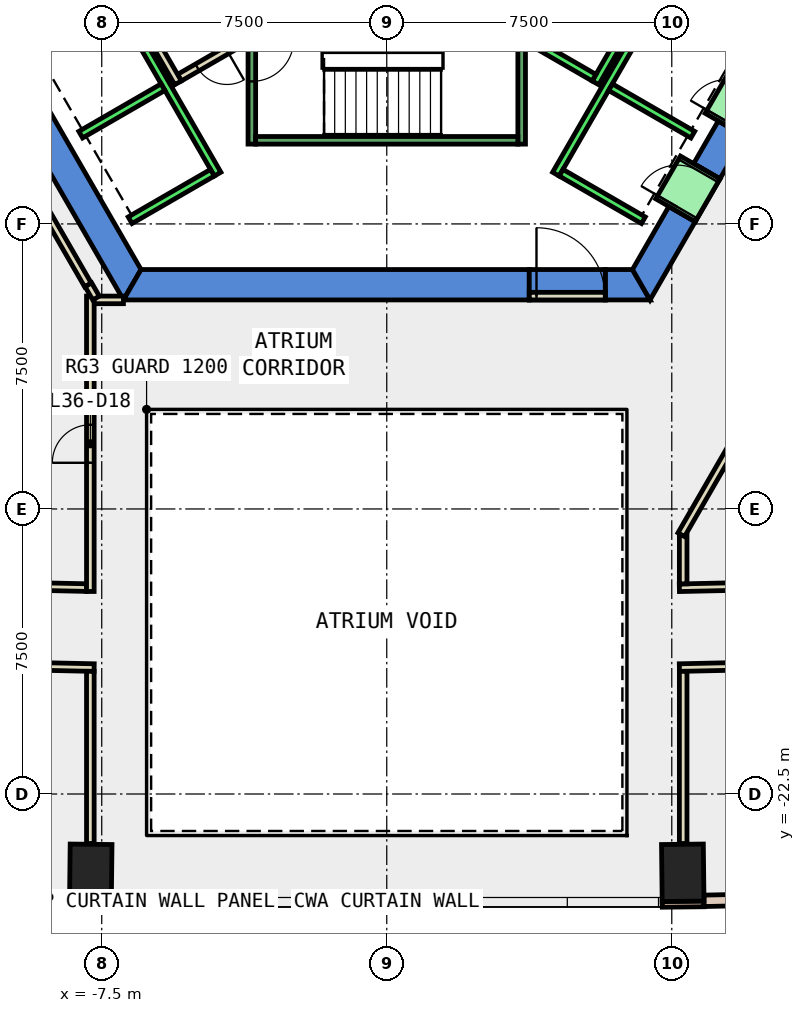
"""IFC4 building model, lengths in metres.
Left out: names, types, materials, properties, quantities, classifications, styles, units other than length and angle.
Written with IfcOpenShell. Run it as: python <this file> out.ifc"""

import sys

from ifc_helpers import new_model, si_unit, direction, frame, frame_2d, origin, origin_2d, place, context, subcontext, project, spatial, polyline, rectangle, outline, extrude, element, fill, save


model = new_model("IFC4")
c1 = context("Model", 3, precision=1e-05, world=origin(), true_north=direction((0.0, 1.0)))
c2 = subcontext(c1, "Body", "Model", "MODEL_VIEW")
j1 = project(units=[si_unit("LENGTHUNIT", "METRE"), si_unit("PLANEANGLEUNIT", "RADIAN")], contexts=[c1])
p1 = place(None, origin())
s1 = spatial("IfcSite", under=j1, at=p1, CompositionType="ELEMENT")
p2 = place(p1, origin())
s2 = spatial("IfcBuilding", under=s1, at=p2, CompositionType="ELEMENT")
p3 = place(p2, frame((0.0, 0.0, 163.4)))
s3 = spatial("IfcBuildingStorey", under=s2, at=p3, CompositionType="ELEMENT", Elevation=163.4)
for number, where, z_axis, x_axis in (
    (1, (-7.789, -24.573, -0.4), (0.0, 0.0, 1.0), (-1.0, 0.012, 0.0)),
    (2, (7.789, -24.573, -0.4), (0.0, 0.0, 1.0), (1.0, 0.012, 0.0)),
):
    element("IfcColumn", number, at=place(p3, frame(where, z_axis=z_axis, x_axis=x_axis)), inside=s3, PredefinedType="COLUMN", context=c2, shape_type="SweptSolid", body=[
        extrude(rectangle(XDim=1.1, YDim=1.5, at=origin_2d()), origin(), (0.0, 0.0, 1.0), 4.2),
    ])
p4 = place(p3, frame((0.0, 0.0, -0.4)))
e3 = element("IfcWall", 3, at=p4, inside=s3, PredefinedType="SHEAR", context=c2, shape_type="SweptSolid", body=[
    extrude(outline(polyline([(-13.856, 2.5), (-6.928, -9.5), (-6.466, -8.7), (-12.933, 2.5), (-13.856, 2.5)])), origin(), (0.0, 0.0, 1.0), 4.2),
])
p5 = place(p3, frame((0.0, 0.0, -0.4)))
e4 = element("IfcWall", 4, at=p5, inside=s3, PredefinedType="SHEAR", context=c2, shape_type="SweptSolid", body=[
    extrude(outline(polyline([(3.75, -9.5), (3.75, -8.7), (-6.466, -8.7), (-6.928, -9.5), (3.75, -9.5)])), origin(), (0.0, 0.0, 1.0), 4.2),
])
p6 = place(p3, frame((0.0, 0.0, -0.4)))
e5 = element("IfcWall", 5, at=p6, inside=s3, PredefinedType="SHEAR", context=c2, shape_type="SweptSolid", body=[
    extrude(outline(polyline([(5.75, -8.7), (5.75, -9.5), (6.928, -9.5), (6.466, -8.7), (5.75, -8.7)])), origin(), (0.0, 0.0, 1.0), 4.2),
])
p7 = place(p3, frame((0.0, 0.0, 3.6)))
e6 = element("IfcWall", 6, at=p7, inside=s3, PredefinedType="SHEAR", context=c2, shape_type="SweptSolid", body=[
    extrude(outline(polyline([(5.75, -9.5), (5.75, -8.7), (3.75, -8.7), (3.75, -9.5), (5.75, -9.5)])), origin(), (0.0, 0.0, 1.0), 0.2),
])
p8 = place(p3, frame((0.0, 0.0, -0.4)))
e7 = element("IfcWall", 7, at=p8, inside=s3, PredefinedType="SHEAR", context=c2, shape_type="SweptSolid", body=[
    extrude(outline(polyline([(8.117, -7.44), (7.424, -7.04), (6.466, -8.7), (6.928, -9.5), (8.117, -7.44)])), origin(), (0.0, 0.0, 1.0), 4.2),
])
p9 = place(p3, frame((0.0, 0.0, -0.4)))
e8 = element("IfcWall", 8, at=p9, inside=s3, PredefinedType="SHEAR", context=c2, shape_type="SweptSolid", body=[
    extrude(outline(polyline([(9.417, -5.189), (8.724, -4.789), (8.075, -5.914), (8.767, -6.314), (9.417, -5.189)])), origin(), (0.0, 0.0, 1.0), 4.2),
])
p10 = place(p3, frame((0.0, 0.0, 3.6)))
e9 = element("IfcWall", 9, at=p10, inside=s3, PredefinedType="SHEAR", context=c2, shape_type="SweptSolid", body=[
    extrude(outline(polyline([(8.767, -6.314), (8.075, -5.914), (7.424, -7.04), (8.117, -7.44), (8.767, -6.314)])), origin(), (0.0, 0.0, 1.0), 0.2),
])
p11 = place(p3, frame((0.0, 0.0, 3.6)))
e10 = element("IfcWall", 10, at=p11, inside=s3, PredefinedType="SHEAR", context=c2, shape_type="SweptSolid", body=[
    extrude(outline(polyline([(10.067, -4.063), (9.374, -3.663), (8.724, -4.789), (9.417, -5.189), (10.067, -4.063)])), origin(), (0.0, 0.0, 1.0), 0.2),
])
for number, where, z_axis, x_axis in (
    (11, (-8.349, -25.392, 0.0), (0.0, 0.0, 1.0), (1.0, -0.011, 0.0)),
    (12, (7.249, -25.404, 0.0), (0.0, 0.0, 1.0), (1.0, 0.011, 0.0)),
):
    element("IfcWall", number, at=place(p3, frame(where, z_axis=z_axis, x_axis=x_axis)), inside=s3, PredefinedType="STANDARD", context=c2, shape_type="SweptSolid", body=[
        extrude(rectangle(XDim=1.1, YDim=0.15, at=frame_2d((0.55, 0.0))), origin(), (0.0, 0.0, 1.0), 3.8),
    ])
p12 = place(p3, frame((-15.68, -25.152, 0.0), z_axis=(0.0, 0.0, 1.0), x_axis=(0.999765201774, -0.021668902196, 0.0)))
e13 = element("IfcWall", 13, at=p12, inside=s3, PredefinedType="STANDARD", context=c2, shape_type="SweptSolid", body=[
    extrude(rectangle(XDim=7.335, YDim=0.3, at=frame_2d((3.667, 0.0))), origin(), (0.0, 0.0, 1.0), 3.8),
])
p13 = place(p12, frame((0.634, 0.0, 0.9)))
e14 = element("IfcOpeningElement", 14, at=p13, cuts=e13, PredefinedType="OPENING", context=c2, shape_type="SweptSolid", body=[
    extrude(rectangle(XDim=2.4, YDim=2.6, at=frame_2d((1.2, 1.3))), frame((0.0, 0.16, 0.0), z_axis=(0.0, -1.0, 0.0), x_axis=(1.0, 0.0, 0.0)), (0.0, 0.0, 1.0), 0.32),
])
p14 = place(p12, frame((4.301, 0.0, 0.9)))
e15 = element("IfcOpeningElement", 15, at=p14, cuts=e13, PredefinedType="OPENING", context=c2, shape_type="SweptSolid", body=[
    extrude(rectangle(XDim=2.4, YDim=2.6, at=frame_2d((1.2, 1.3))), frame((0.0, 0.16, 0.0), z_axis=(0.0, -1.0, 0.0), x_axis=(1.0, 0.0, 0.0)), (0.0, 0.0, 1.0), 0.32),
])
p15 = place(p3, frame((8.347, -25.311, 0.0), z_axis=(0.0, 0.0, 1.0), x_axis=(0.999765201774, 0.021668902196, 0.0)))
e16 = element("IfcWall", 16, at=p15, inside=s3, PredefinedType="STANDARD", context=c2, shape_type="SweptSolid", body=[
    extrude(rectangle(XDim=7.335, YDim=0.3, at=frame_2d((3.667, 0.0))), origin(), (0.0, 0.0, 1.0), 3.8),
])
p16 = place(p15, frame((0.634, 0.0, 0.9)))
e17 = element("IfcOpeningElement", 17, at=p16, cuts=e16, PredefinedType="OPENING", context=c2, shape_type="SweptSolid", body=[
    extrude(rectangle(XDim=2.4, YDim=2.6, at=frame_2d((1.2, 1.3))), frame((0.0, 0.16, 0.0), z_axis=(0.0, -1.0, 0.0), x_axis=(1.0, 0.0, 0.0)), (0.0, 0.0, 1.0), 0.32),
])
p17 = place(p15, frame((4.301, 0.0, 0.9)))
e18 = element("IfcOpeningElement", 18, at=p17, cuts=e16, PredefinedType="OPENING", context=c2, shape_type="SweptSolid", body=[
    extrude(rectangle(XDim=2.4, YDim=2.6, at=frame_2d((1.2, 1.3))), frame((0.0, 0.16, 0.0), z_axis=(0.0, -1.0, 0.0), x_axis=(1.0, 0.0, 0.0)), (0.0, 0.0, 1.0), 0.32),
])
p18 = place(p3, frame((7.7, -17.073, 0.0), z_axis=(0.0, 0.0, 1.0), x_axis=(0.999764372799, 0.021707115919, 0.0)))
e19 = element("IfcWall", 19, at=p18, inside=s3, PredefinedType="PARTITIONING", context=c2, shape_type="SweptSolid", body=[
    extrude(rectangle(XDim=8.289, YDim=0.2, at=frame_2d((4.145, 0.0))), origin(), (0.0, 0.0, 1.0), 3.8),
])
p19 = place(p18, frame((3.245, 0.0, 0.0)))
e20 = element("IfcOpeningElement", 20, at=p19, cuts=e19, PredefinedType="OPENING", context=c2, shape_type="SweptSolid", body=[
    extrude(rectangle(XDim=1.8, YDim=2.1, at=frame_2d((0.9, 1.05))), frame((0.0, 0.11, 0.0), z_axis=(0.0, -1.0, 0.0), x_axis=(1.0, 0.0, 0.0)), (0.0, 0.0, 1.0), 0.22),
])
p20 = place(p3, frame((-11.278, -16.996, 0.0), z_axis=(0.0, 0.0, 1.0), x_axis=(0.999766613119, -0.021603687022, 0.0)))
e21 = element("IfcWall", 21, at=p20, inside=s3, PredefinedType="PARTITIONING", context=c2, shape_type="SweptSolid", body=[
    extrude(rectangle(XDim=3.379, YDim=0.2, at=frame_2d((1.689, 0.0))), origin(), (0.0, 0.0, 1.0), 3.8),
])
p21 = place(p3, frame((16.049, -18.992, 0.0), z_axis=(0.0, 0.0, 1.0), x_axis=(-0.999762156504, -0.021808952826, 0.0)))
e22 = element("IfcWall", 22, at=p21, inside=s3, PredefinedType="PARTITIONING", context=c2, shape_type="SweptSolid", body=[
    extrude(rectangle(XDim=8.351, YDim=0.2, at=frame_2d((4.176, 0.0))), origin(), (0.0, 0.0, 1.0), 3.8),
])
p22 = place(p21, frame((3.675, 0.0, 0.0)))
e23 = element("IfcOpeningElement", 23, at=p22, cuts=e22, PredefinedType="OPENING", context=c2, shape_type="SweptSolid", body=[
    extrude(rectangle(XDim=1.0, YDim=2.1, at=frame_2d((0.5, 1.05))), frame((0.0, 0.11, 0.0), z_axis=(0.0, -1.0, 0.0), x_axis=(1.0, 0.0, 0.0)), (0.0, 0.0, 1.0), 0.22),
])
p23 = place(p3, frame((-7.7, -19.174, 0.0), z_axis=(0.0, 0.0, 1.0), x_axis=(-0.999762993889, 0.02177053169, 0.0)))
e24 = element("IfcWall", 24, at=p23, inside=s3, PredefinedType="PARTITIONING", context=c2, shape_type="SweptSolid", body=[
    extrude(rectangle(XDim=8.276, YDim=0.2, at=frame_2d((4.138, 0.0))), origin(), (0.0, 0.0, 1.0), 3.8),
])
p24 = place(p23, frame((3.713, 0.0, 0.0)))
e25 = element("IfcOpeningElement", 25, at=p24, cuts=e24, PredefinedType="OPENING", context=c2, shape_type="SweptSolid", body=[
    extrude(rectangle(XDim=1.0, YDim=2.1, at=frame_2d((0.5, 1.05))), frame((0.0, 0.11, 0.0), z_axis=(0.0, -1.0, 0.0), x_axis=(1.0, 0.0, 0.0)), (0.0, 0.0, 1.0), 0.22),
])
p25 = place(p3, frame((-3.65, -2.61, 0.0), z_axis=(0.0, 0.0, 1.0), x_axis=(-0.866072462134, -0.499918483688, 0.0)))
e26 = element("IfcWall", 26, at=p25, inside=s3, PredefinedType="PARTITIONING", context=c2, shape_type="SweptSolid", body=[
    extrude(rectangle(XDim=2.084, YDim=0.2, at=frame_2d((1.042, 0.0))), origin(), (0.0, 0.0, 1.0), 3.8),
])
p26 = place(p25, frame((0.642, 0.0, 0.0)))
e27 = element("IfcOpeningElement", 27, at=p26, cuts=e26, PredefinedType="OPENING", context=c2, shape_type="SweptSolid", body=[
    extrude(rectangle(XDim=0.9, YDim=2.1, at=frame_2d((0.45, 1.05))), frame((0.0, 0.11, 0.0), z_axis=(0.0, -1.0, 0.0), x_axis=(1.0, 0.0, 0.0)), (0.0, 0.0, 1.0), 0.22),
])
p27 = place(p3, frame((-5.492, -3.788, 0.0), z_axis=(0.0, 0.0, 1.0), x_axis=(-0.500008949224, 0.866020236886, 0.0)))
e28 = element("IfcWall", 28, at=p27, inside=s3, PredefinedType="PARTITIONING", context=c2, shape_type="SweptSolid", body=[
    extrude(rectangle(XDim=2.68, YDim=0.2, at=frame_2d((1.34, 0.0))), origin(), (0.0, 0.0, 1.0), 3.8),
])
p28 = place(p3, frame((7.8, -15.69, 0.0), z_axis=(0.0, 0.0, 1.0), x_axis=(0.0, -1.0, 0.0)))
e29 = element("IfcWall", 29, at=p28, inside=s3, PredefinedType="PARTITIONING", context=c2, shape_type="SweptSolid", body=[
    extrude(rectangle(XDim=1.281, YDim=0.2, at=frame_2d((0.641, 0.0))), origin(), (0.0, 0.0, 1.0), 3.8),
])
p29 = place(p3, frame((-7.722, -9.499, 0.0), z_axis=(0.0, 0.0, 1.0), x_axis=(1.0, 0.0, 0.0)))
e30 = element("IfcWall", 30, at=p29, inside=s3, PredefinedType="PARTITIONING", context=c2, shape_type="SweptSolid", body=[
    extrude(rectangle(XDim=0.793, YDim=0.2, at=frame_2d((0.396, 0.0))), origin(), (0.0, 0.0, 1.0), 3.8),
])
p30 = place(p3, frame((-7.8, -17.171, 0.0), z_axis=(0.0, 0.0, 1.0), x_axis=(0.0, 1.0, 0.0)))
e31 = element("IfcWall", 31, at=p30, inside=s3, PredefinedType="PARTITIONING", context=c2, shape_type="SweptSolid", body=[
    extrude(rectangle(XDim=7.772, YDim=0.2, at=frame_2d((3.886, 0.0))), origin(), (0.0, 0.0, 1.0), 3.8),
])
p31 = place(p30, frame((3.386, 0.0, 0.0)))
e32 = element("IfcOpeningElement", 32, at=p31, cuts=e31, PredefinedType="OPENING", context=c2, shape_type="SweptSolid", body=[
    extrude(rectangle(XDim=1.0, YDim=2.1, at=frame_2d((0.5, 1.05))), frame((0.0, 0.11, 0.0), z_axis=(0.0, -1.0, 0.0), x_axis=(1.0, 0.0, 0.0)), (0.0, 0.0, 1.0), 0.22),
])
for number, where, z_axis, x_axis in (
    (33, (7.8, -19.272, 0.0), (0.0, 0.0, 1.0), (0.0, -1.0, 0.0)),
    (34, (-7.8, -23.803, 0.0), (0.0, 0.0, 1.0), (0.0, 1.0, 0.0)),
):
    element("IfcWall", number, at=place(p3, frame(where, z_axis=z_axis, x_axis=x_axis)), inside=s3, PredefinedType="PARTITIONING", context=c2, shape_type="SweptSolid", body=[
        extrude(rectangle(XDim=4.531, YDim=0.2, at=frame_2d((2.266, 0.0))), origin(), (0.0, 0.0, 1.0), 3.8),
    ])
p32 = place(p3, frame((-7.862, -9.107, 0.0), z_axis=(0.0, 0.0, 1.0), x_axis=(-0.499994038704, 0.866028845513, 0.0)))
e35 = element("IfcWall", 35, at=p32, inside=s3, PredefinedType="PARTITIONING", context=c2, shape_type="SweptSolid", body=[
    extrude(rectangle(XDim=2.568, YDim=0.2, at=frame_2d((1.284, 0.0))), origin(), (0.0, 0.0, 1.0), 3.8),
])
p33 = place(p3, frame((-7.65, -9.451, 0.0), z_axis=(0.0, 0.0, 1.0), x_axis=(-0.500297731093, 0.865853440406, 0.0)))
e36 = element("IfcWall", 36, at=p33, inside=s3, PredefinedType="PARTITIONING", context=c2, shape_type="SweptSolid", body=[
    extrude(rectangle(XDim=0.404, YDim=0.2, at=frame_2d((0.202, 0.0))), origin(), (0.0, 0.0, 1.0), 3.8),
])
p34 = place(p3, frame((3.75, -9.4, 0.0), z_axis=(0.0, 0.0, 1.0), x_axis=(1.0, 0.0, 0.0)))
e37 = element("IfcWall", 37, at=p34, inside=s3, PredefinedType="PARTITIONING", context=c2, shape_type="SweptSolid", body=[
    extrude(rectangle(XDim=2.0, YDim=0.2, at=frame_2d((1.0, 0.0))), origin(), (0.0, 0.0, 1.0), 2.4),
])
p35 = place(p34, frame((0.19, 0.0, 0.0)))
e38 = element("IfcOpeningElement", 38, at=p35, cuts=e37, PredefinedType="OPENING", context=c2, shape_type="SweptSolid", body=[
    extrude(rectangle(XDim=1.8, YDim=2.1, at=frame_2d((0.9, 1.05))), frame((0.0, 0.11, 0.0), z_axis=(0.0, -1.0, 0.0), x_axis=(1.0, 0.0, 0.0)), (0.0, 0.0, 1.0), 0.22),
])
p36 = place(p3, frame((12.401, -7.621, 0.0), z_axis=(0.0, 0.0, 1.0), x_axis=(-0.499983724212, -0.866034800411, 0.0)))
e39 = element("IfcWall", 39, at=p36, inside=s3, PredefinedType="PARTITIONING", context=c2, shape_type="SweptSolid", body=[
    extrude(rectangle(XDim=9.302, YDim=0.2, at=frame_2d((4.651, 0.0))), origin(), (0.0, 0.0, 1.0), 3.8),
])
p37 = place(p3, frame((-9.751, 2.99, 0.0), z_axis=(0.0, 0.0, 1.0), x_axis=(0.50000090737, -0.866024879913, 0.0)))
e40 = element("IfcWall", 40, at=p37, inside=s3, PredefinedType="STANDARD", context=c2, shape_type="SweptSolid", body=[
    extrude(rectangle(XDim=10.6, YDim=0.2, at=frame_2d((5.3, 0.0))), origin(), (0.0, 0.0, 1.0), 3.8),
])
for number, where, z_axis, x_axis in (
    (41, (-5.888, -3.902, 0.0), (0.0, 0.0, 1.0), (-0.866, -0.5, 0.0)),
    (42, (-4.588, -6.153, 0.0), (0.0, 0.0, 1.0), (-0.866, -0.5, 0.0)),
):
    element("IfcWall", number, at=place(p3, frame(where, z_axis=z_axis, x_axis=x_axis)), inside=s3, PredefinedType="STANDARD", context=c2, shape_type="SweptSolid", body=[
        extrude(rectangle(XDim=2.5, YDim=0.2, at=frame_2d((1.25, 0.0))), origin(), (0.0, 0.0, 1.0), 3.8),
    ])
p38 = place(p3, frame((5.492, -3.788, 0.0), z_axis=(0.0, 0.0, 1.0), x_axis=(0.500011755427, 0.866018616679, 0.0)))
e43 = element("IfcWall", 43, at=p38, inside=s3, PredefinedType="STANDARD", context=c2, shape_type="SweptSolid", body=[
    extrude(rectangle(XDim=2.8, YDim=0.2, at=frame_2d((1.4, 0.0))), origin(), (0.0, 0.0, 1.0), 3.8),
])
p39 = place(p3, frame((3.377, -2.452, 0.0), z_axis=(0.0, 0.0, 1.0), x_axis=(0.865955154139, -0.50012165622, 0.0)))
e44 = element("IfcWall", 44, at=p39, inside=s3, PredefinedType="STANDARD", context=c2, shape_type="SweptSolid", body=[
    extrude(rectangle(XDim=2.4, YDim=0.2, at=frame_2d((1.2, 0.0))), origin(), (0.0, 0.0, 1.0), 3.8),
])
p40 = place(p3, frame((4.451, -6.19, 0.0), z_axis=(0.0, 0.0, 1.0), x_axis=(0.50000090737, 0.866024879913, 0.0)))
e45 = element("IfcWall", 45, at=p40, inside=s3, PredefinedType="STANDARD", context=c2, shape_type="SweptSolid", body=[
    extrude(rectangle(XDim=10.6, YDim=0.2, at=frame_2d((5.3, 0.0))), origin(), (0.0, 0.0, 1.0), 3.8),
])
for number, where, z_axis, x_axis in (
    (46, (4.588, -6.153, 0.0), (0.0, 0.0, 1.0), (0.866, -0.5, 0.0)),
    (47, (5.888, -3.902, 0.0), (0.0, 0.0, 1.0), (0.866, -0.5, 0.0)),
):
    element("IfcWall", number, at=place(p3, frame(where, z_axis=z_axis, x_axis=x_axis)), inside=s3, PredefinedType="STANDARD", context=c2, shape_type="SweptSolid", body=[
        extrude(rectangle(XDim=2.5, YDim=0.2, at=frame_2d((1.25, 0.0))), origin(), (0.0, 0.0, 1.0), 3.8),
    ])
p41 = place(p3, frame((7.598, -7.14, 0.0), z_axis=(0.0, 0.0, 1.0), x_axis=(0.500362116554, 0.865816234728, 0.0)))
e48 = element("IfcWall", 48, at=p41, inside=s3, PredefinedType="STANDARD", context=c2, shape_type="SweptSolid", body=[
    extrude(rectangle(XDim=1.299, YDim=1.2, at=frame_2d((0.65, 0.0))), origin(), (0.0, 0.0, 1.0), 2.4),
])
p42 = place(p41, frame((0.1, 0.0, 0.0)))
e49 = element("IfcOpeningElement", 49, at=p42, cuts=e48, PredefinedType="OPENING", context=c2, shape_type="SweptSolid", body=[
    extrude(rectangle(XDim=1.1, YDim=2.3, at=frame_2d((0.55, 1.15))), frame((0.0, 0.61, 0.0), z_axis=(0.0, -1.0, 0.0), x_axis=(1.0, 0.0, 0.0)), (0.0, 0.0, 1.0), 1.22),
])
p43 = place(p3, frame((8.898, -4.889, 0.0), z_axis=(0.0, 0.0, 1.0), x_axis=(0.500036693733, 0.866004217611, 0.0)))
e50 = element("IfcWall", 50, at=p43, inside=s3, PredefinedType="STANDARD", context=c2, shape_type="SweptSolid", body=[
    extrude(rectangle(XDim=1.3, YDim=1.2, at=frame_2d((0.65, 0.0))), origin(), (0.0, 0.0, 1.0), 2.4),
])
p44 = place(p43, frame((0.1, 0.0, 0.0)))
e51 = element("IfcOpeningElement", 51, at=p44, cuts=e50, PredefinedType="OPENING", context=c2, shape_type="SweptSolid", body=[
    extrude(rectangle(XDim=1.1, YDim=2.3, at=frame_2d((0.55, 1.15))), frame((0.0, 0.61, 0.0), z_axis=(0.0, -1.0, 0.0), x_axis=(1.0, 0.0, 0.0)), (0.0, 0.0, 1.0), 1.22),
])
p45 = place(p3, frame((-3.55, -1.0, 0.0), z_axis=(0.0, 0.0, 1.0), x_axis=(0.0, -1.0, 0.0)))
e52 = element("IfcWall", 52, at=p45, inside=s3, PredefinedType="STANDARD", context=c2, shape_type="SweptSolid", body=[
    extrude(rectangle(XDim=4.4, YDim=0.2, at=frame_2d((2.2, 0.0))), origin(), (0.0, 0.0, 1.0), 3.8),
])
p46 = place(p45, frame((1.65, 0.0, 0.0)))
e53 = element("IfcOpeningElement", 53, at=p46, cuts=e52, PredefinedType="OPENING", context=c2, shape_type="SweptSolid", body=[
    extrude(rectangle(XDim=1.1, YDim=2.2, at=frame_2d((0.55, 1.1))), frame((0.0, 0.11, 0.0), z_axis=(0.0, -1.0, 0.0), x_axis=(1.0, 0.0, 0.0)), (0.0, 0.0, 1.0), 0.22),
])
p47 = place(p3, frame((3.55, -2.667, 0.0), z_axis=(0.0, 0.0, 1.0), x_axis=(0.0, -1.0, 0.0)))
e54 = element("IfcWall", 54, at=p47, inside=s3, PredefinedType="STANDARD", context=c2, shape_type="SweptSolid", body=[
    extrude(rectangle(XDim=2.733, YDim=0.2, at=frame_2d((1.366, 0.0))), origin(), (0.0, 0.0, 1.0), 3.8),
])
p48 = place(p3, frame((-3.45, -5.3, 0.0), z_axis=(0.0, 0.0, 1.0), x_axis=(1.0, 0.0, 0.0)))
e55 = element("IfcWall", 55, at=p48, inside=s3, PredefinedType="STANDARD", context=c2, shape_type="SweptSolid", body=[
    extrude(rectangle(XDim=6.9, YDim=0.2, at=frame_2d((3.45, 0.0))), origin(), (0.0, 0.0, 1.0), 3.8),
])
p49 = place(p31, origin())
e56 = element("IfcDoor", 56, at=p49, inside=s3, OperationType="SINGLE_SWING_LEFT", PredefinedType="DOOR", context=c2, shape_type="SweptSolid", body=[
    extrude(rectangle(XDim=1.0, YDim=2.1, at=frame_2d((0.5, 1.05))), frame((0.0, 0.025, 0.0), z_axis=(0.0, -1.0, 0.0), x_axis=(1.0, 0.0, 0.0)), (0.0, 0.0, 1.0), 0.05),
])
fill(e32, e56)
p50 = place(p26, origin())
e57 = element("IfcDoor", 57, at=p50, inside=s3, OperationType="SINGLE_SWING_LEFT", PredefinedType="DOOR", context=c2, shape_type="SweptSolid", body=[
    extrude(rectangle(XDim=0.9, YDim=2.1, at=frame_2d((0.45, 1.05))), frame((0.0, 0.025, 0.0), z_axis=(0.0, -1.0, 0.0), x_axis=(1.0, 0.0, 0.0)), (0.0, 0.0, 1.0), 0.05),
])
fill(e27, e57)
p51 = place(p35, origin())
e58 = element("IfcDoor", 58, at=p51, inside=s3, OperationType="DOUBLE_DOOR_SINGLE_SWING", PredefinedType="DOOR", context=c2, shape_type="SweptSolid", body=[
    extrude(rectangle(XDim=1.8, YDim=2.1, at=frame_2d((0.9, 1.05))), frame((0.0, 0.025, 0.0), z_axis=(0.0, -1.0, 0.0), x_axis=(1.0, 0.0, 0.0)), (0.0, 0.0, 1.0), 0.05),
])
fill(e38, e58)
p52 = place(p42, origin())
e59 = element("IfcDoor", 59, at=p52, inside=s3, OperationType="SLIDING_TO_LEFT", PredefinedType="DOOR", context=c2, shape_type="SweptSolid", body=[
    extrude(rectangle(XDim=1.1, YDim=2.3, at=frame_2d((0.55, 1.15))), frame((0.0, 0.025, 0.0), z_axis=(0.0, -1.0, 0.0), x_axis=(1.0, 0.0, 0.0)), (0.0, 0.0, 1.0), 0.05),
])
fill(e49, e59)
p53 = place(p46, origin())
e60 = element("IfcDoor", 60, at=p53, inside=s3, OperationType="SINGLE_SWING_LEFT", PredefinedType="DOOR", context=c2, shape_type="SweptSolid", body=[
    extrude(rectangle(XDim=1.1, YDim=2.2, at=frame_2d((0.55, 1.1))), frame((0.0, 0.025, 0.0), z_axis=(0.0, -1.0, 0.0), x_axis=(1.0, 0.0, 0.0)), (0.0, 0.0, 1.0), 0.05),
])
fill(e53, e60)
save(model, sys.argv[1])
